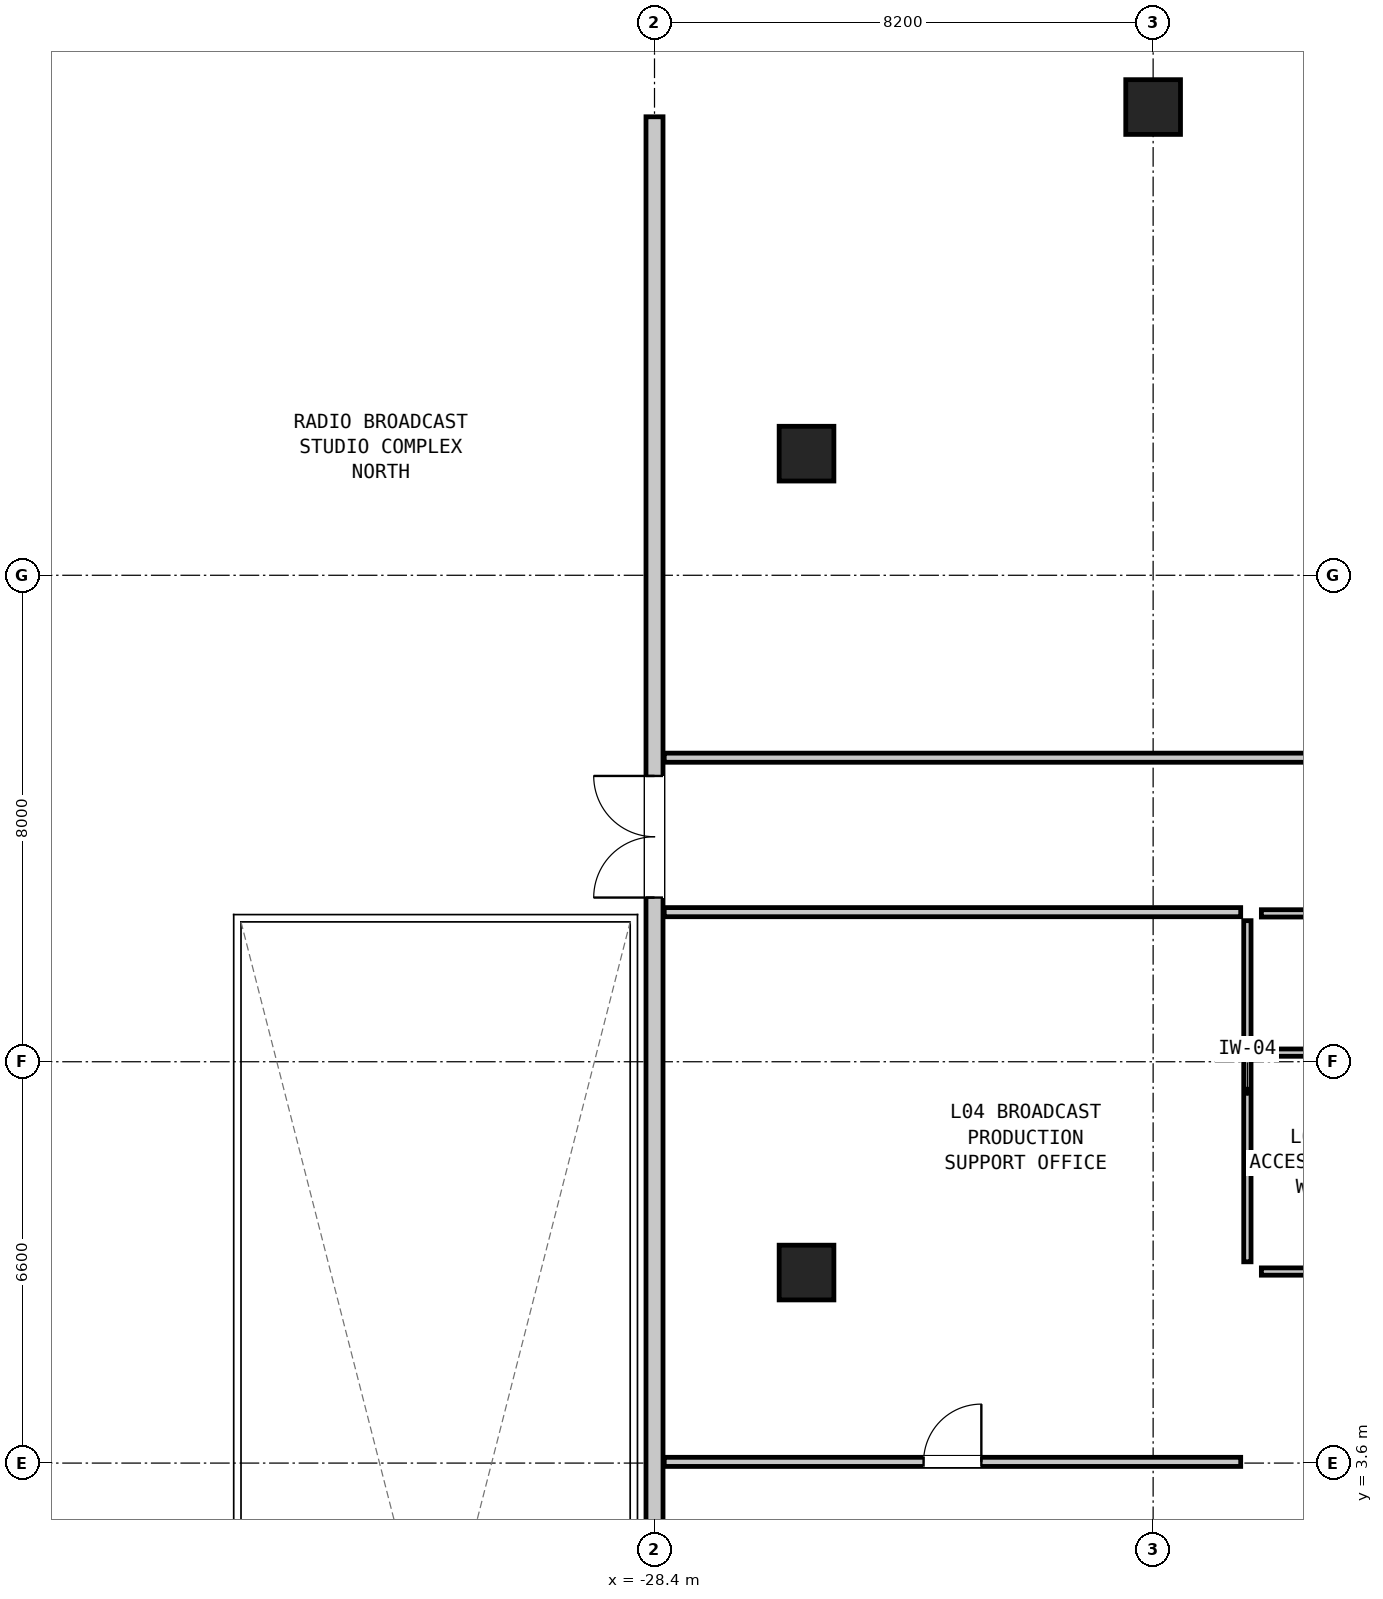
"""IFC4 building model, lengths in metres.
Left out: names, types, materials, properties, quantities, classifications, styles, units other than length and angle.
Written with IfcOpenShell. Run it as: python <this file> out.ifc"""

import sys

from ifc_helpers import new_model, si_unit, direction, frame, frame_2d, origin, origin_2d, place, context, subcontext, project, spatial, rectangle, hollow_rectangle, extrude, element, fill, save


model = new_model("IFC4")
c1 = context("Model", 3, precision=1e-05, world=origin(), true_north=direction((0.0, 1.0)))
c2 = subcontext(c1, "Body", "Model", "MODEL_VIEW")
j1 = project(units=[si_unit("LENGTHUNIT", "METRE"), si_unit("PLANEANGLEUNIT", "RADIAN")], contexts=[c1])
p1 = place(None, origin())
s1 = spatial("IfcSite", under=j1, at=p1, CompositionType="ELEMENT")
p2 = place(p1, origin())
s2 = spatial("IfcBuilding", under=s1, at=p2, CompositionType="ELEMENT")
p3 = place(p2, frame((0.0, 0.0, 17.7)))
s3 = spatial("IfcBuildingStorey", under=s2, at=p3, CompositionType="ELEMENT", Elevation=17.7)
for number, where, z_axis, x_axis in (
    (1, (-20.2, 25.9, 0.0), (0.0, 0.0, 1.0), (1.0, 0.0, 0.0)),
    (2, (-25.9, 20.2, 0.0), (0.0, 0.0, 1.0), (0.0, 1.0, 0.0)),
    (3, (-25.9, 6.733, 0.0), (0.0, 0.0, 1.0), (0.0, 1.0, 0.0)),
):
    element("IfcColumn", number, at=place(p3, frame(where, z_axis=z_axis, x_axis=x_axis)), inside=s3, PredefinedType="COLUMN", context=c2, shape_type="SweptSolid", body=[
        extrude(hollow_rectangle(XDim=0.9, YDim=0.9, WallThickness=0.055, at=origin_2d()), origin(), (0.0, 0.0, 1.0), 4.2),
    ])
for number, where, z_axis, x_axis in (
    (4, (-18.42, 6.75, 0.0), (0.0, 0.0, 1.0), (1.0, 0.0, 0.0)),
    (5, (-18.42, 12.64, 0.0), (0.0, 0.0, 1.0), (1.0, 0.0, 0.0)),
):
    element("IfcWall", number, at=place(p3, frame(where, z_axis=z_axis, x_axis=x_axis)), inside=s3, PredefinedType="PARTITIONING", context=c2, shape_type="SweptSolid", body=[
        extrude(rectangle(XDim=5.84, YDim=0.12, at=frame_2d((2.92, 0.0))), origin(), (0.0, 0.0, 1.0), 3.82),
    ])
p4 = place(p3, frame((-18.65, 6.91, 0.0), z_axis=(0.0, 0.0, 1.0), x_axis=(0.0, 1.0, 0.0)))
e6 = element("IfcWall", 6, at=p4, inside=s3, PredefinedType="PARTITIONING", context=c2, shape_type="SweptSolid", body=[
    extrude(rectangle(XDim=5.61, YDim=0.12, at=frame_2d((2.805, 0.0))), origin(), (0.0, 0.0, 1.0), 3.82),
])
p5 = place(p3, frame((-18.49, 10.35, 0.0), z_axis=(0.0, 0.0, 1.0), x_axis=(1.0, 0.0, 0.0)))
e7 = element("IfcWall", 7, at=p5, inside=s3, PredefinedType="PARTITIONING", context=c2, shape_type="SweptSolid", body=[
    extrude(rectangle(XDim=5.98, YDim=0.12, at=frame_2d((2.99, 0.0))), origin(), (0.0, 0.0, 1.0), 3.82),
])
p6 = place(p3, frame((-28.4, -25.74, 0.0), z_axis=(0.0, 0.0, 1.0), x_axis=(0.0, 1.0, 0.0)))
e8 = element("IfcWall", 8, at=p6, inside=s3, PredefinedType="MOVABLE", context=c2, shape_type="SweptSolid", body=[
    extrude(rectangle(XDim=51.48, YDim=0.28, at=frame_2d((25.74, 0.0))), origin(), (0.0, 0.0, 1.0), 3.82),
])
p7 = place(p6, frame((11.149, 0.0, 0.0)))
e9 = element("IfcOpeningElement", 9, at=p7, cuts=e8, PredefinedType="OPENING", context=c2, shape_type="SweptSolid", body=[
    extrude(rectangle(XDim=2.0, YDim=2.14, at=frame_2d((1.0, 1.07))), frame((0.0, 0.152, 0.0), z_axis=(0.0, -1.0, 0.0), x_axis=(1.0, 0.0, 0.0)), (0.0, 0.0, 1.0), 0.304),
])
p8 = place(p6, frame((38.64, 0.0, 0.0)))
e10 = element("IfcOpeningElement", 10, at=p8, cuts=e8, PredefinedType="OPENING", context=c2, shape_type="SweptSolid", body=[
    extrude(rectangle(XDim=2.0, YDim=2.14, at=frame_2d((1.0, 1.07))), frame((0.0, 0.152, 0.0), z_axis=(0.0, -1.0, 0.0), x_axis=(1.0, 0.0, 0.0)), (0.0, 0.0, 1.0), 0.304),
])
p9 = place(p3, frame((-28.24, 15.2, 0.0), z_axis=(0.0, 0.0, 1.0), x_axis=(1.0, 0.0, 0.0)))
e11 = element("IfcWall", 11, at=p9, inside=s3, PredefinedType="PARTITIONING", context=c2, shape_type="SweptSolid", body=[
    extrude(rectangle(XDim=32.58, YDim=0.15, at=frame_2d((16.29, 0.0))), origin(), (0.0, 0.0, 1.0), 3.82),
])
p10 = place(p9, frame((24.812, 0.0, 0.0)))
e12 = element("IfcOpeningElement", 12, at=p10, cuts=e11, PredefinedType="OPENING", context=c2, shape_type="SweptSolid", body=[
    extrude(rectangle(XDim=1.2, YDim=2.1, at=frame_2d((0.6, 1.05))), frame((0.0, 0.087, 0.0), z_axis=(0.0, -1.0, 0.0), x_axis=(1.0, 0.0, 0.0)), (0.0, 0.0, 1.0), 0.174),
])
p11 = place(p3, frame((-28.24, 12.66, 0.0), z_axis=(0.0, 0.0, 1.0), x_axis=(1.0, 0.0, 0.0)))
e13 = element("IfcWall", 13, at=p11, inside=s3, PredefinedType="PARTITIONING", context=c2, shape_type="SweptSolid", body=[
    extrude(rectangle(XDim=9.48, YDim=0.15, at=frame_2d((4.74, 0.0))), origin(), (0.0, 0.0, 1.0), 3.82),
])
p12 = place(p3, frame((-28.24, 3.62, 0.0), z_axis=(0.0, 0.0, 1.0), x_axis=(1.0, 0.0, 0.0)))
e14 = element("IfcWall", 14, at=p12, inside=s3, PredefinedType="PARTITIONING", context=c2, shape_type="SweptSolid", body=[
    extrude(rectangle(XDim=9.48, YDim=0.15, at=frame_2d((4.74, 0.0))), origin(), (0.0, 0.0, 1.0), 2.682),
])
p13 = place(p12, frame((4.265, 0.0, 0.0)))
e15 = element("IfcOpeningElement", 15, at=p13, cuts=e14, PredefinedType="OPENING", context=c2, shape_type="SweptSolid", body=[
    extrude(rectangle(XDim=0.95, YDim=2.1, at=frame_2d((0.475, 1.05))), frame((0.0, 0.087, 0.0), z_axis=(0.0, -1.0, 0.0), x_axis=(1.0, 0.0, 0.0)), (0.0, 0.0, 1.0), 0.174),
])
p14 = place(p8, origin())
e16 = element("IfcDoor", 16, at=p14, inside=s3, OperationType="DOUBLE_DOOR_SINGLE_SWING", PredefinedType="DOOR", context=c2, shape_type="SweptSolid", body=[
    extrude(rectangle(XDim=2.0, YDim=2.14, at=frame_2d((1.0, 1.07))), frame((0.0, 0.025, 0.0), z_axis=(0.0, -1.0, 0.0), x_axis=(1.0, 0.0, 0.0)), (0.0, 0.0, 1.0), 0.05),
])
fill(e10, e16)
p15 = place(p13, origin())
e17 = element("IfcDoor", 17, at=p15, inside=s3, OperationType="SINGLE_SWING_RIGHT", PredefinedType="DOOR", context=c2, shape_type="SweptSolid", body=[
    extrude(rectangle(XDim=0.95, YDim=2.1, at=frame_2d((0.475, 1.05))), frame((0.0, 0.025, 0.0), z_axis=(0.0, -1.0, 0.0), x_axis=(1.0, 0.0, 0.0)), (0.0, 0.0, 1.0), 0.05),
])
fill(e15, e17)
save(model, sys.argv[1])
